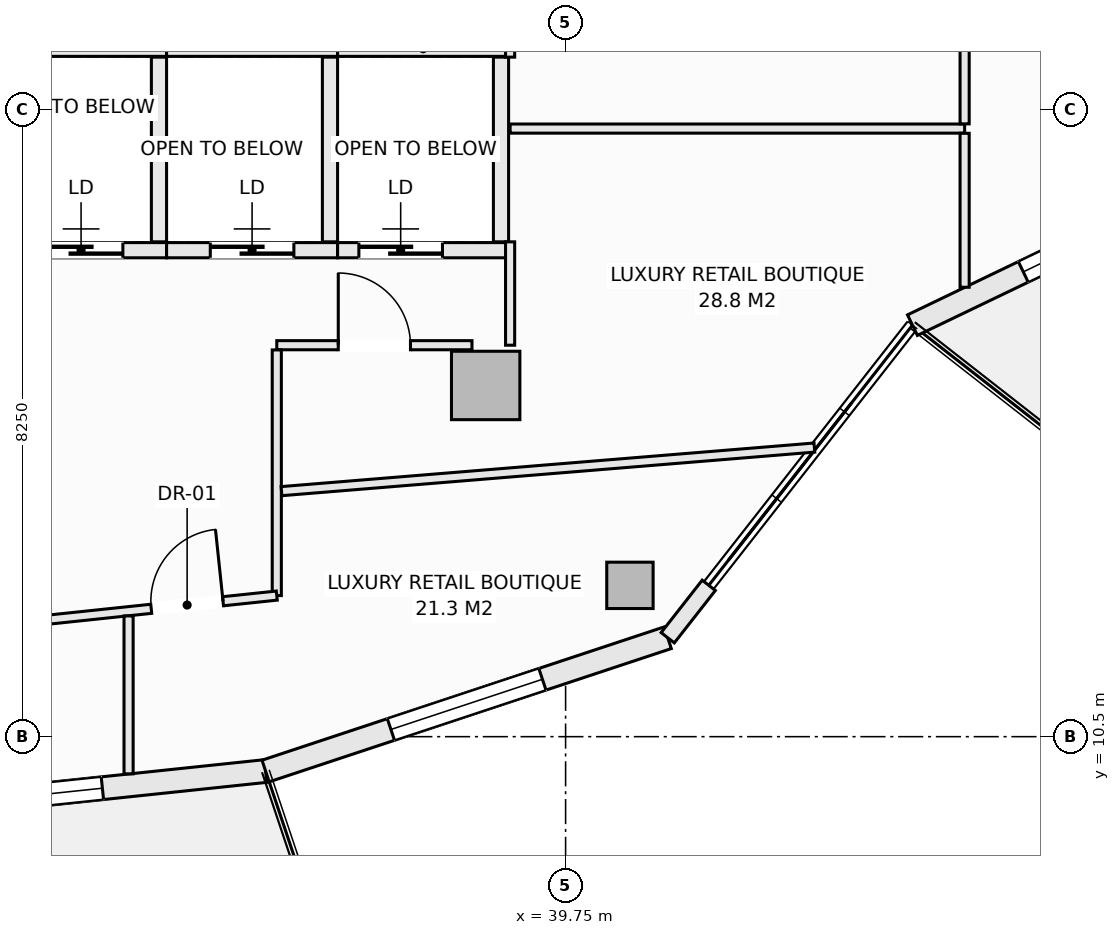
"""IFC4 building model, lengths in metres.
Left out: names, types, materials, properties, quantities, classifications, styles, units other than length and angle.
Written with IfcOpenShell. Run it as: python <this file> out.ifc"""

import sys

from ifc_helpers import new_model, si_unit, direction, frame, frame_2d, origin, origin_2d, place, context, subcontext, project, spatial, rectangle, hollow_rectangle, extrude, element, fill, save


model = new_model("IFC4")
c1 = context("Model", 3, precision=1e-05, world=origin(), true_north=direction((0.0, 1.0)))
c2 = subcontext(c1, "Body", "Model", "MODEL_VIEW")
j1 = project(units=[si_unit("LENGTHUNIT", "METRE"), si_unit("PLANEANGLEUNIT", "RADIAN")], contexts=[c1])
p1 = place(None, origin())
s1 = spatial("IfcSite", under=j1, at=p1, CompositionType="ELEMENT")
p2 = place(p1, origin())
s2 = spatial("IfcBuilding", under=s1, at=p2, CompositionType="ELEMENT")
p3 = place(p2, frame((0.0, 0.0, 163.1)))
s3 = spatial("IfcBuildingStorey", under=s2, at=p3, CompositionType="ELEMENT", Elevation=163.1)
p4 = place(p3, frame((40.596, 12.49, -0.27), z_axis=(0.0, 0.0, 1.0), x_axis=(1.0, 0.0, 0.0)))
e1 = element("IfcColumn", 1, at=p4, inside=s3, PredefinedType="COLUMN", context=c2, shape_type="SweptSolid", body=[
    extrude(hollow_rectangle(XDim=0.61, YDim=0.61, WallThickness=0.025, at=origin_2d()), origin(), (0.0, 0.0, 1.0), 3.4),
])
p5 = place(p3, frame((38.698, 15.121, -0.27), z_axis=(0.0, 0.0, 1.0), x_axis=(1.0, 0.0, 0.0)))
e2 = element("IfcColumn", 2, at=p5, inside=s3, PredefinedType="COLUMN", context=c2, shape_type="SweptSolid", body=[
    extrude(rectangle(XDim=0.9, YDim=0.9, at=origin_2d()), origin(), (0.0, 0.0, 1.0), 3.4),
])
p6 = place(p3, frame((30.125, 9.45, 0.0), z_axis=(0.0, 0.0, 1.0), x_axis=(0.994496545245, 0.104769372887, 0.0)))
e3 = element("IfcWall", 3, at=p6, inside=s3, PredefinedType="SOLIDWALL", context=c2, shape_type="SweptSolid", body=[
    extrude(rectangle(XDim=5.709, YDim=0.3, at=frame_2d((2.854, 0.0))), origin(), (0.0, 0.0, 1.0), 2.653),
])
p7 = place(p6, frame((1.45, 0.0, 0.74)))
e4 = element("IfcOpeningElement", 4, at=p7, cuts=e3, PredefinedType="OPENING", context=c2, shape_type="SweptSolid", body=[
    extrude(rectangle(XDim=2.1, YDim=1.7, at=frame_2d((1.05, 0.85))), frame((0.0, 0.16, 0.0), z_axis=(0.0, -1.0, 0.0), x_axis=(1.0, 0.0, 0.0)), (0.0, 0.0, 1.0), 0.32),
])
p8 = place(p3, frame((35.803, 10.048, 0.0), z_axis=(0.0, 0.0, 1.0), x_axis=(0.949246811547, 0.314532177636, 0.0)))
e5 = element("IfcWall", 5, at=p8, inside=s3, PredefinedType="SOLIDWALL", context=c2, shape_type="SweptSolid", body=[
    extrude(rectangle(XDim=5.574, YDim=0.3, at=frame_2d((2.787, 0.0))), origin(), (0.0, 0.0, 1.0), 2.653),
])
p9 = place(p8, frame((1.737, 0.0, 0.74)))
e6 = element("IfcOpeningElement", 6, at=p9, cuts=e5, PredefinedType="OPENING", context=c2, shape_type="SweptSolid", body=[
    extrude(rectangle(XDim=2.1, YDim=1.7, at=frame_2d((1.05, 0.85))), frame((0.0, 0.16, 0.0), z_axis=(0.0, -1.0, 0.0), x_axis=(1.0, 0.0, 0.0)), (0.0, 0.0, 1.0), 0.32),
])
p10 = place(p3, frame((41.094, 11.801, 0.0), z_axis=(0.0, 0.0, 1.0), x_axis=(0.616368366719, 0.787457958566, 0.0)))
e7 = element("IfcWall", 7, at=p10, inside=s3, PredefinedType="SOLIDWALL", context=c2, shape_type="SweptSolid", body=[
    extrude(rectangle(XDim=0.876, YDim=0.22, at=frame_2d((0.438, 0.0))), origin(), (0.0, 0.0, 1.0), 2.653),
])
p11 = place(p3, frame((44.313, 15.914, 0.0), z_axis=(0.0, 0.0, 1.0), x_axis=(0.901353070301, 0.433085029363, 0.0)))
e8 = element("IfcWall", 8, at=p11, inside=s3, PredefinedType="SOLIDWALL", context=c2, shape_type="SweptSolid", body=[
    extrude(rectangle(XDim=5.336, YDim=0.3, at=frame_2d((2.668, 0.0))), origin(), (0.0, 0.0, 1.0), 2.653),
])
p12 = place(p11, frame((1.618, 0.0, 0.74)))
e9 = element("IfcOpeningElement", 9, at=p12, cuts=e8, PredefinedType="OPENING", context=c2, shape_type="SweptSolid", body=[
    extrude(rectangle(XDim=2.1, YDim=1.7, at=frame_2d((1.05, 0.85))), frame((0.0, 0.16, 0.0), z_axis=(0.0, -1.0, 0.0), x_axis=(1.0, 0.0, 0.0)), (0.0, 0.0, 1.0), 0.32),
])
p13 = place(p3, frame((32.25, 19.55, 0.0), z_axis=(0.0, 0.0, 1.0), x_axis=(1.0, 0.0, 0.0)))
e10 = element("IfcWall", 10, at=p13, inside=s3, PredefinedType="SOLIDWALL", context=c2, shape_type="SweptSolid", body=[
    extrude(rectangle(XDim=2.25, YDim=0.2, at=frame_2d((1.125, 0.0))), origin(), (0.0, 0.0, 1.0), 3.13),
])
p14 = place(p3, frame((32.25, 16.9, 0.0), z_axis=(0.0, 0.0, 1.0), x_axis=(1.0, 0.0, 0.0)))
e11 = element("IfcWall", 11, at=p14, inside=s3, PredefinedType="SOLIDWALL", context=c2, shape_type="SweptSolid", body=[
    extrude(rectangle(XDim=2.25, YDim=0.2, at=frame_2d((1.125, 0.0))), origin(), (0.0, 0.0, 1.0), 3.13),
])
p15 = place(p14, frame((0.575, 0.0, 0.0)))
e12 = element("IfcOpeningElement", 12, at=p15, cuts=e11, PredefinedType="OPENING", context=c2, shape_type="SweptSolid", body=[
    extrude(rectangle(XDim=1.1, YDim=2.2, at=frame_2d((0.55, 1.1))), frame((0.0, 0.11, 0.0), z_axis=(0.0, -1.0, 0.0), x_axis=(1.0, 0.0, 0.0)), (0.0, 0.0, 1.0), 0.22),
])
p16 = place(p3, frame((34.4, 17.01, 0.0), z_axis=(0.0, 0.0, 1.0), x_axis=(0.0, 1.0, 0.0)))
e13 = element("IfcWall", 13, at=p16, inside=s3, PredefinedType="SOLIDWALL", context=c2, shape_type="SweptSolid", body=[
    extrude(rectangle(XDim=2.43, YDim=0.2, at=frame_2d((1.215, 0.0))), origin(), (0.0, 0.0, 1.0), 3.13),
])
p17 = place(p3, frame((34.5, 19.55, 0.0), z_axis=(0.0, 0.0, 1.0), x_axis=(1.0, 0.0, 0.0)))
e14 = element("IfcWall", 14, at=p17, inside=s3, PredefinedType="SOLIDWALL", context=c2, shape_type="SweptSolid", body=[
    extrude(rectangle(XDim=2.25, YDim=0.2, at=frame_2d((1.125, 0.0))), origin(), (0.0, 0.0, 1.0), 3.13),
])
p18 = place(p3, frame((34.5, 16.9, 0.0), z_axis=(0.0, 0.0, 1.0), x_axis=(1.0, 0.0, 0.0)))
e15 = element("IfcWall", 15, at=p18, inside=s3, PredefinedType="SOLIDWALL", context=c2, shape_type="SweptSolid", body=[
    extrude(rectangle(XDim=2.25, YDim=0.2, at=frame_2d((1.125, 0.0))), origin(), (0.0, 0.0, 1.0), 3.13),
])
p19 = place(p18, frame((0.575, 0.0, 0.0)))
e16 = element("IfcOpeningElement", 16, at=p19, cuts=e15, PredefinedType="OPENING", context=c2, shape_type="SweptSolid", body=[
    extrude(rectangle(XDim=1.1, YDim=2.2, at=frame_2d((0.55, 1.1))), frame((0.0, 0.11, 0.0), z_axis=(0.0, -1.0, 0.0), x_axis=(1.0, 0.0, 0.0)), (0.0, 0.0, 1.0), 0.22),
])
p20 = place(p3, frame((36.65, 17.01, 0.0), z_axis=(0.0, 0.0, 1.0), x_axis=(0.0, 1.0, 0.0)))
e17 = element("IfcWall", 17, at=p20, inside=s3, PredefinedType="SOLIDWALL", context=c2, shape_type="SweptSolid", body=[
    extrude(rectangle(XDim=2.43, YDim=0.2, at=frame_2d((1.215, 0.0))), origin(), (0.0, 0.0, 1.0), 3.13),
])
p21 = place(p3, frame((36.75, 19.55, 0.0), z_axis=(0.0, 0.0, 1.0), x_axis=(1.0, 0.0, 0.0)))
e18 = element("IfcWall", 18, at=p21, inside=s3, PredefinedType="SOLIDWALL", context=c2, shape_type="SweptSolid", body=[
    extrude(rectangle(XDim=2.25, YDim=0.2, at=frame_2d((1.125, 0.0))), origin(), (0.0, 0.0, 1.0), 3.13),
])
p22 = place(p3, frame((36.75, 16.9, 0.0), z_axis=(0.0, 0.0, 1.0), x_axis=(1.0, 0.0, 0.0)))
e19 = element("IfcWall", 19, at=p22, inside=s3, PredefinedType="SOLIDWALL", context=c2, shape_type="SweptSolid", body=[
    extrude(rectangle(XDim=2.25, YDim=0.2, at=frame_2d((1.125, 0.0))), origin(), (0.0, 0.0, 1.0), 3.13),
])
p23 = place(p22, frame((0.28, 0.0, 0.0)))
e20 = element("IfcOpeningElement", 20, at=p23, cuts=e19, PredefinedType="OPENING", context=c2, shape_type="SweptSolid", body=[
    extrude(rectangle(XDim=1.1, YDim=2.2, at=frame_2d((0.55, 1.1))), frame((0.0, 0.11, 0.0), z_axis=(0.0, -1.0, 0.0), x_axis=(1.0, 0.0, 0.0)), (0.0, 0.0, 1.0), 0.22),
])
p24 = place(p3, frame((38.9, 17.01, 0.0), z_axis=(0.0, 0.0, 1.0), x_axis=(0.0, 1.0, 0.0)))
e21 = element("IfcWall", 21, at=p24, inside=s3, PredefinedType="SOLIDWALL", context=c2, shape_type="SweptSolid", body=[
    extrude(rectangle(XDim=2.43, YDim=0.2, at=frame_2d((1.215, 0.0))), origin(), (0.0, 0.0, 1.0), 3.13),
])
p25 = place(p3, frame((39.02, 15.65, 0.0), z_axis=(0.0, 0.0, 1.0), x_axis=(0.0, 1.0, 0.0)))
e22 = element("IfcWall", 22, at=p25, inside=s3, PredefinedType="PARTITIONING", context=c2, shape_type="SweptSolid", body=[
    extrude(rectangle(XDim=1.36, YDim=0.12, at=frame_2d((0.68, 0.0))), origin(), (0.0, 0.0, 1.0), 2.505),
])
p26 = place(p3, frame((39.02, 19.44, 0.0), z_axis=(0.0, 0.0, 1.0), x_axis=(0.0, 1.0, 0.0)))
e23 = element("IfcWall", 23, at=p26, inside=s3, PredefinedType="PARTITIONING", context=c2, shape_type="SweptSolid", body=[
    extrude(rectangle(XDim=0.92, YDim=0.12, at=frame_2d((0.46, 0.0))), origin(), (0.0, 0.0, 1.0), 3.13),
])
p27 = place(p3, frame((35.95, 15.65, 0.0), z_axis=(0.0, 0.0, 1.0), x_axis=(1.0, 0.0, 0.0)))
e24 = element("IfcWall", 24, at=p27, inside=s3, PredefinedType="PARTITIONING", context=c2, shape_type="SweptSolid", body=[
    extrude(rectangle(XDim=2.568, YDim=0.12, at=frame_2d((1.284, 0.0))), origin(), (0.0, 0.0, 1.0), 3.13),
])
p28 = place(p27, frame((0.809, 0.0, 0.0)))
e25 = element("IfcOpeningElement", 25, at=p28, cuts=e24, PredefinedType="OPENING", context=c2, shape_type="SweptSolid", body=[
    extrude(rectangle(XDim=0.95, YDim=2.1, at=frame_2d((0.475, 1.05))), frame((0.0, 0.07, 0.0), z_axis=(0.0, -1.0, 0.0), x_axis=(1.0, 0.0, 0.0)), (0.0, 0.0, 1.0), 0.14),
])
p29 = place(p3, frame((35.95, 12.356, 0.0), z_axis=(0.0, 0.0, 1.0), x_axis=(0.0, 1.0, 0.0)))
e26 = element("IfcWall", 26, at=p29, inside=s3, PredefinedType="PARTITIONING", context=c2, shape_type="SweptSolid", body=[
    extrude(rectangle(XDim=3.232, YDim=0.12, at=frame_2d((1.616, 0.0))), origin(), (0.0, 0.0, 1.0), 3.13),
])
p30 = place(p3, frame((30.195, 11.75, 0.0), z_axis=(0.0, 0.0, 1.0), x_axis=(0.994502215954, 0.104715531139, 0.0)))
e27 = element("IfcWall", 27, at=p30, inside=s3, PredefinedType="PARTITIONING", context=c2, shape_type="SweptSolid", body=[
    extrude(rectangle(XDim=5.787, YDim=0.12, at=frame_2d((2.893, 0.0))), origin(), (0.0, 0.0, 1.0), 3.13),
])
p31 = place(p30, frame((1.644, 0.0, 0.0)))
e28 = element("IfcOpeningElement", 28, at=p31, cuts=e27, PredefinedType="OPENING", context=c2, shape_type="SweptSolid", body=[
    extrude(rectangle(XDim=0.95, YDim=2.1, at=frame_2d((0.475, 1.05))), frame((0.0, 0.07, 0.0), z_axis=(0.0, -1.0, 0.0), x_axis=(1.0, 0.0, 0.0)), (0.0, 0.0, 1.0), 0.14),
])
p32 = place(p30, frame((4.126, 0.0, 0.0)))
e29 = element("IfcOpeningElement", 29, at=p32, cuts=e27, PredefinedType="OPENING", context=c2, shape_type="SweptSolid", body=[
    extrude(rectangle(XDim=0.95, YDim=2.1, at=frame_2d((0.475, 1.05))), frame((0.0, 0.07, 0.0), z_axis=(0.0, -1.0, 0.0), x_axis=(1.0, 0.0, 0.0)), (0.0, 0.0, 1.0), 0.14),
])
p33 = place(p3, frame((34.0, 10.011, 0.0), z_axis=(0.0, 0.0, 1.0), x_axis=(0.0, 1.0, 0.0)))
e30 = element("IfcWall", 30, at=p33, inside=s3, PredefinedType="PARTITIONING", context=c2, shape_type="SweptSolid", body=[
    extrude(rectangle(XDim=2.077, YDim=0.12, at=frame_2d((1.039, 0.0))), origin(), (0.0, 0.0, 1.0), 3.13),
])
p34 = place(p3, frame((36.012, 13.73, 0.0), z_axis=(0.0, 0.0, 1.0), x_axis=(0.996671680688, 0.081520309828, 0.0)))
e31 = element("IfcWall", 31, at=p34, inside=s3, PredefinedType="PARTITIONING", context=c2, shape_type="SweptSolid", body=[
    extrude(rectangle(XDim=7.035, YDim=0.12, at=frame_2d((3.518, 0.0))), origin(), (0.0, 0.0, 1.0), 2.653),
])
p35 = place(p3, frame((39.02, 18.5, 0.0), z_axis=(0.0, 0.0, 1.0), x_axis=(1.0, 0.0, 0.0)))
e32 = element("IfcWall", 32, at=p35, inside=s3, PredefinedType="PARTITIONING", context=c2, shape_type="SweptSolid", body=[
    extrude(rectangle(XDim=5.98, YDim=0.12, at=frame_2d((2.99, 0.0))), origin(), (0.0, 0.0, 1.0), 2.812),
])
p36 = place(p3, frame((45.0, 16.413, 0.0), z_axis=(0.0, 0.0, 1.0), x_axis=(0.0, 1.0, 0.0)))
e33 = element("IfcWall", 33, at=p36, inside=s3, PredefinedType="PARTITIONING", context=c2, shape_type="SweptSolid", body=[
    extrude(rectangle(XDim=2.025, YDim=0.12, at=frame_2d((1.013, 0.0))), origin(), (0.0, 0.0, 1.0), 3.13),
])
p37 = place(p3, frame((45.0, 18.562, 0.0), z_axis=(0.0, 0.0, 1.0), x_axis=(0.0, 1.0, 0.0)))
e34 = element("IfcWall", 34, at=p37, inside=s3, PredefinedType="PARTITIONING", context=c2, shape_type="SweptSolid", body=[
    extrude(rectangle(XDim=1.585, YDim=0.12, at=frame_2d((0.792, 0.0))), origin(), (0.0, 0.0, 1.0), 3.13),
])
p38 = place(p7, origin())
e35 = element("IfcWindow", 35, at=p38, inside=s3, PartitioningType="SINGLE_PANEL", PredefinedType="WINDOW", context=c2, shape_type="SweptSolid", body=[
    extrude(rectangle(XDim=2.1, YDim=1.7, at=frame_2d((1.05, 0.85))), frame((0.0, 0.03, 0.0), z_axis=(0.0, -1.0, 0.0), x_axis=(1.0, 0.0, 0.0)), (0.0, 0.0, 1.0), 0.06),
])
fill(e4, e35)
p39 = place(p9, origin())
e36 = element("IfcWindow", 36, at=p39, inside=s3, PartitioningType="SINGLE_PANEL", PredefinedType="WINDOW", context=c2, shape_type="SweptSolid", body=[
    extrude(rectangle(XDim=2.1, YDim=1.7, at=frame_2d((1.05, 0.85))), frame((0.0, 0.03, 0.0), z_axis=(0.0, -1.0, 0.0), x_axis=(1.0, 0.0, 0.0)), (0.0, 0.0, 1.0), 0.06),
])
fill(e6, e36)
p40 = place(p12, origin())
e37 = element("IfcWindow", 37, at=p40, inside=s3, PartitioningType="SINGLE_PANEL", PredefinedType="WINDOW", context=c2, shape_type="SweptSolid", body=[
    extrude(rectangle(XDim=2.1, YDim=1.7, at=frame_2d((1.05, 0.85))), frame((0.0, 0.03, 0.0), z_axis=(0.0, -1.0, 0.0), x_axis=(1.0, 0.0, 0.0)), (0.0, 0.0, 1.0), 0.06),
])
fill(e9, e37)
p41 = place(p15, origin())
e38 = element("IfcDoor", 38, at=p41, inside=s3, OperationType="SLIDING_TO_LEFT", PredefinedType="DOOR", context=c2, shape_type="SweptSolid", body=[
    extrude(rectangle(XDim=1.1, YDim=2.2, at=frame_2d((0.55, 1.1))), frame((0.0, 0.025, 0.0), z_axis=(0.0, -1.0, 0.0), x_axis=(1.0, 0.0, 0.0)), (0.0, 0.0, 1.0), 0.05),
])
fill(e12, e38)
p42 = place(p19, origin())
e39 = element("IfcDoor", 39, at=p42, inside=s3, OperationType="SLIDING_TO_LEFT", PredefinedType="DOOR", context=c2, shape_type="SweptSolid", body=[
    extrude(rectangle(XDim=1.1, YDim=2.2, at=frame_2d((0.55, 1.1))), frame((0.0, 0.025, 0.0), z_axis=(0.0, -1.0, 0.0), x_axis=(1.0, 0.0, 0.0)), (0.0, 0.0, 1.0), 0.05),
])
fill(e16, e39)
p43 = place(p23, origin())
e40 = element("IfcDoor", 40, at=p43, inside=s3, OperationType="SLIDING_TO_LEFT", PredefinedType="DOOR", context=c2, shape_type="SweptSolid", body=[
    extrude(rectangle(XDim=1.1, YDim=2.2, at=frame_2d((0.55, 1.1))), frame((0.0, 0.025, 0.0), z_axis=(0.0, -1.0, 0.0), x_axis=(1.0, 0.0, 0.0)), (0.0, 0.0, 1.0), 0.05),
])
fill(e20, e40)
p44 = place(p32, origin())
e41 = element("IfcDoor", 41, at=p44, inside=s3, OperationType="SINGLE_SWING_RIGHT", PredefinedType="DOOR", context=c2, shape_type="SweptSolid", body=[
    extrude(rectangle(XDim=0.95, YDim=2.1, at=frame_2d((0.475, 1.05))), frame((0.0, 0.025, 0.0), z_axis=(0.0, -1.0, 0.0), x_axis=(1.0, 0.0, 0.0)), (0.0, 0.0, 1.0), 0.05),
])
fill(e29, e41)
p45 = place(p28, origin())
e42 = element("IfcDoor", 42, at=p45, inside=s3, OperationType="SINGLE_SWING_LEFT", PredefinedType="DOOR", context=c2, shape_type="SweptSolid", body=[
    extrude(rectangle(XDim=0.95, YDim=2.1, at=frame_2d((0.475, 1.05))), frame((0.0, 0.025, 0.0), z_axis=(0.0, -1.0, 0.0), x_axis=(1.0, 0.0, 0.0)), (0.0, 0.0, 1.0), 0.05),
])
fill(e25, e42)
save(model, sys.argv[1])
